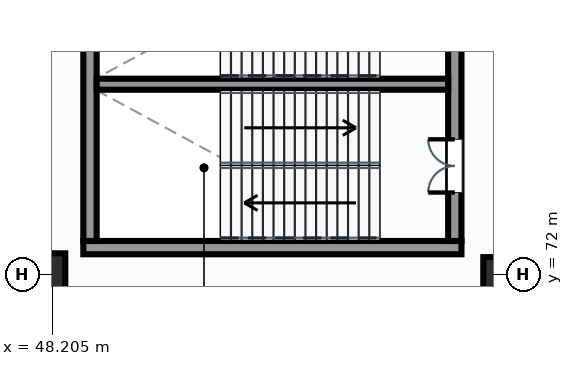
"""IFC4 building model, lengths in metres.
Left out: names, types, materials, properties, quantities, classifications, styles, units other than length and angle.
Written with IfcOpenShell. Run it as: python <this file> out.ifc"""

import sys

from ifc_helpers import new_model, si_unit, direction, frame, frame_2d, origin, origin_2d, place, context, subcontext, project, spatial, rectangle, extrude, element, fill, save


model = new_model("IFC4")
c1 = context("Model", 3, precision=1e-05, world=origin(), true_north=direction((0.0, 1.0)))
c2 = subcontext(c1, "Body", "Model", "MODEL_VIEW")
j1 = project(units=[si_unit("LENGTHUNIT", "METRE"), si_unit("PLANEANGLEUNIT", "RADIAN")], contexts=[c1])
p1 = place(None, origin())
s1 = spatial("IfcSite", under=j1, at=p1, CompositionType="ELEMENT")
p2 = place(p1, origin())
s2 = spatial("IfcBuilding", under=s1, at=p2, CompositionType="ELEMENT")
p3 = place(p2, frame((0.0, 0.0, 19.2)))
s3 = spatial("IfcBuildingStorey", under=s2, at=p3, CompositionType="ELEMENT", Elevation=19.2)
p4 = place(p3, frame((48.0, 72.0, 0.0), z_axis=(0.0, 0.0, 1.0), x_axis=(1.0, 0.0, 0.0)))
e1 = element("IfcColumn", 1, at=p4, inside=s3, PredefinedType="COLUMN", context=c2, shape_type="SweptSolid", body=[
    extrude(rectangle(XDim=1.1, YDim=1.1, at=origin_2d()), origin(), (0.0, 0.0, 1.0), 5.4),
])
p5 = place(p3, frame((60.0, 72.0, 0.0), z_axis=(0.0, 0.0, 1.0), x_axis=(1.0, 0.0, 0.0)))
e2 = element("IfcColumn", 2, at=p5, inside=s3, PredefinedType="COLUMN", context=c2, shape_type="SweptSolid", body=[
    extrude(rectangle(XDim=0.9, YDim=0.9, at=origin_2d()), origin(), (0.0, 0.0, 1.0), 5.4),
])
p6 = place(p3, frame((49.025, 72.7, 0.0), z_axis=(0.0, 0.0, 1.0), x_axis=(1.0, 0.0, 0.0)))
e3 = element("IfcWall", 3, at=p6, inside=s3, PredefinedType="SHEAR", context=c2, shape_type="SweptSolid", body=[
    extrude(rectangle(XDim=9.95, YDim=0.35, at=frame_2d((4.975, 0.0))), origin(), (0.0, 0.0, 1.0), 5.4),
])
p7 = place(p3, frame((49.2, 72.875, 0.0), z_axis=(0.0, 0.0, 1.0), x_axis=(0.0, 1.0, 0.0)))
e4 = element("IfcWall", 4, at=p7, inside=s3, PredefinedType="SHEAR", context=c2, shape_type="SweptSolid", body=[
    extrude(rectangle(XDim=8.25, YDim=0.35, at=frame_2d((4.125, 0.0))), origin(), (0.0, 0.0, 1.0), 5.4),
])
p8 = place(p3, frame((58.8, 72.875, 0.0), z_axis=(0.0, 0.0, 1.0), x_axis=(0.0, 1.0, 0.0)))
e5 = element("IfcWall", 5, at=p8, inside=s3, PredefinedType="SHEAR", context=c2, shape_type="SweptSolid", body=[
    extrude(rectangle(XDim=8.25, YDim=0.35, at=frame_2d((4.125, 0.0))), origin(), (0.0, 0.0, 1.0), 5.4),
])
p9 = place(p8, frame((1.275, 0.0, 0.0)))
e6 = element("IfcOpeningElement", 6, at=p9, cuts=e5, PredefinedType="OPENING", context=c2, shape_type="SweptSolid", body=[
    extrude(rectangle(XDim=1.4, YDim=2.2, at=frame_2d((0.7, 1.1))), frame((0.0, 0.185, 0.0), z_axis=(0.0, -1.0, 0.0), x_axis=(1.0, 0.0, 0.0)), (0.0, 0.0, 1.0), 0.37),
])
p10 = place(p8, frame((5.615, 0.0, 0.0)))
e7 = element("IfcOpeningElement", 7, at=p10, cuts=e5, PredefinedType="OPENING", context=c2, shape_type="SweptSolid", body=[
    extrude(rectangle(XDim=1.32, YDim=2.2, at=frame_2d((0.66, 1.1))), frame((0.0, 0.185, 0.0), z_axis=(0.0, -1.0, 0.0), x_axis=(1.0, 0.0, 0.0)), (0.0, 0.0, 1.0), 0.37),
])
p11 = place(p3, frame((49.375, 77.0, 0.0), z_axis=(0.0, 0.0, 1.0), x_axis=(1.0, 0.0, 0.0)))
e8 = element("IfcWall", 8, at=p11, inside=s3, PredefinedType="SHEAR", context=c2, shape_type="SweptSolid", body=[
    extrude(rectangle(XDim=9.25, YDim=0.29, at=frame_2d((4.625, 0.0))), origin(), (0.0, 0.0, 1.0), 5.4),
])
p12 = place(p9, origin())
e9 = element("IfcDoor", 9, at=p12, inside=s3, OperationType="DOUBLE_DOOR_SINGLE_SWING", PredefinedType="DOOR", context=c2, shape_type="SweptSolid", body=[
    extrude(rectangle(XDim=1.4, YDim=2.2, at=frame_2d((0.7, 1.1))), frame((0.0, 0.025, 0.0), z_axis=(0.0, -1.0, 0.0), x_axis=(1.0, 0.0, 0.0)), (0.0, 0.0, 1.0), 0.05),
])
fill(e6, e9)
save(model, sys.argv[1])
